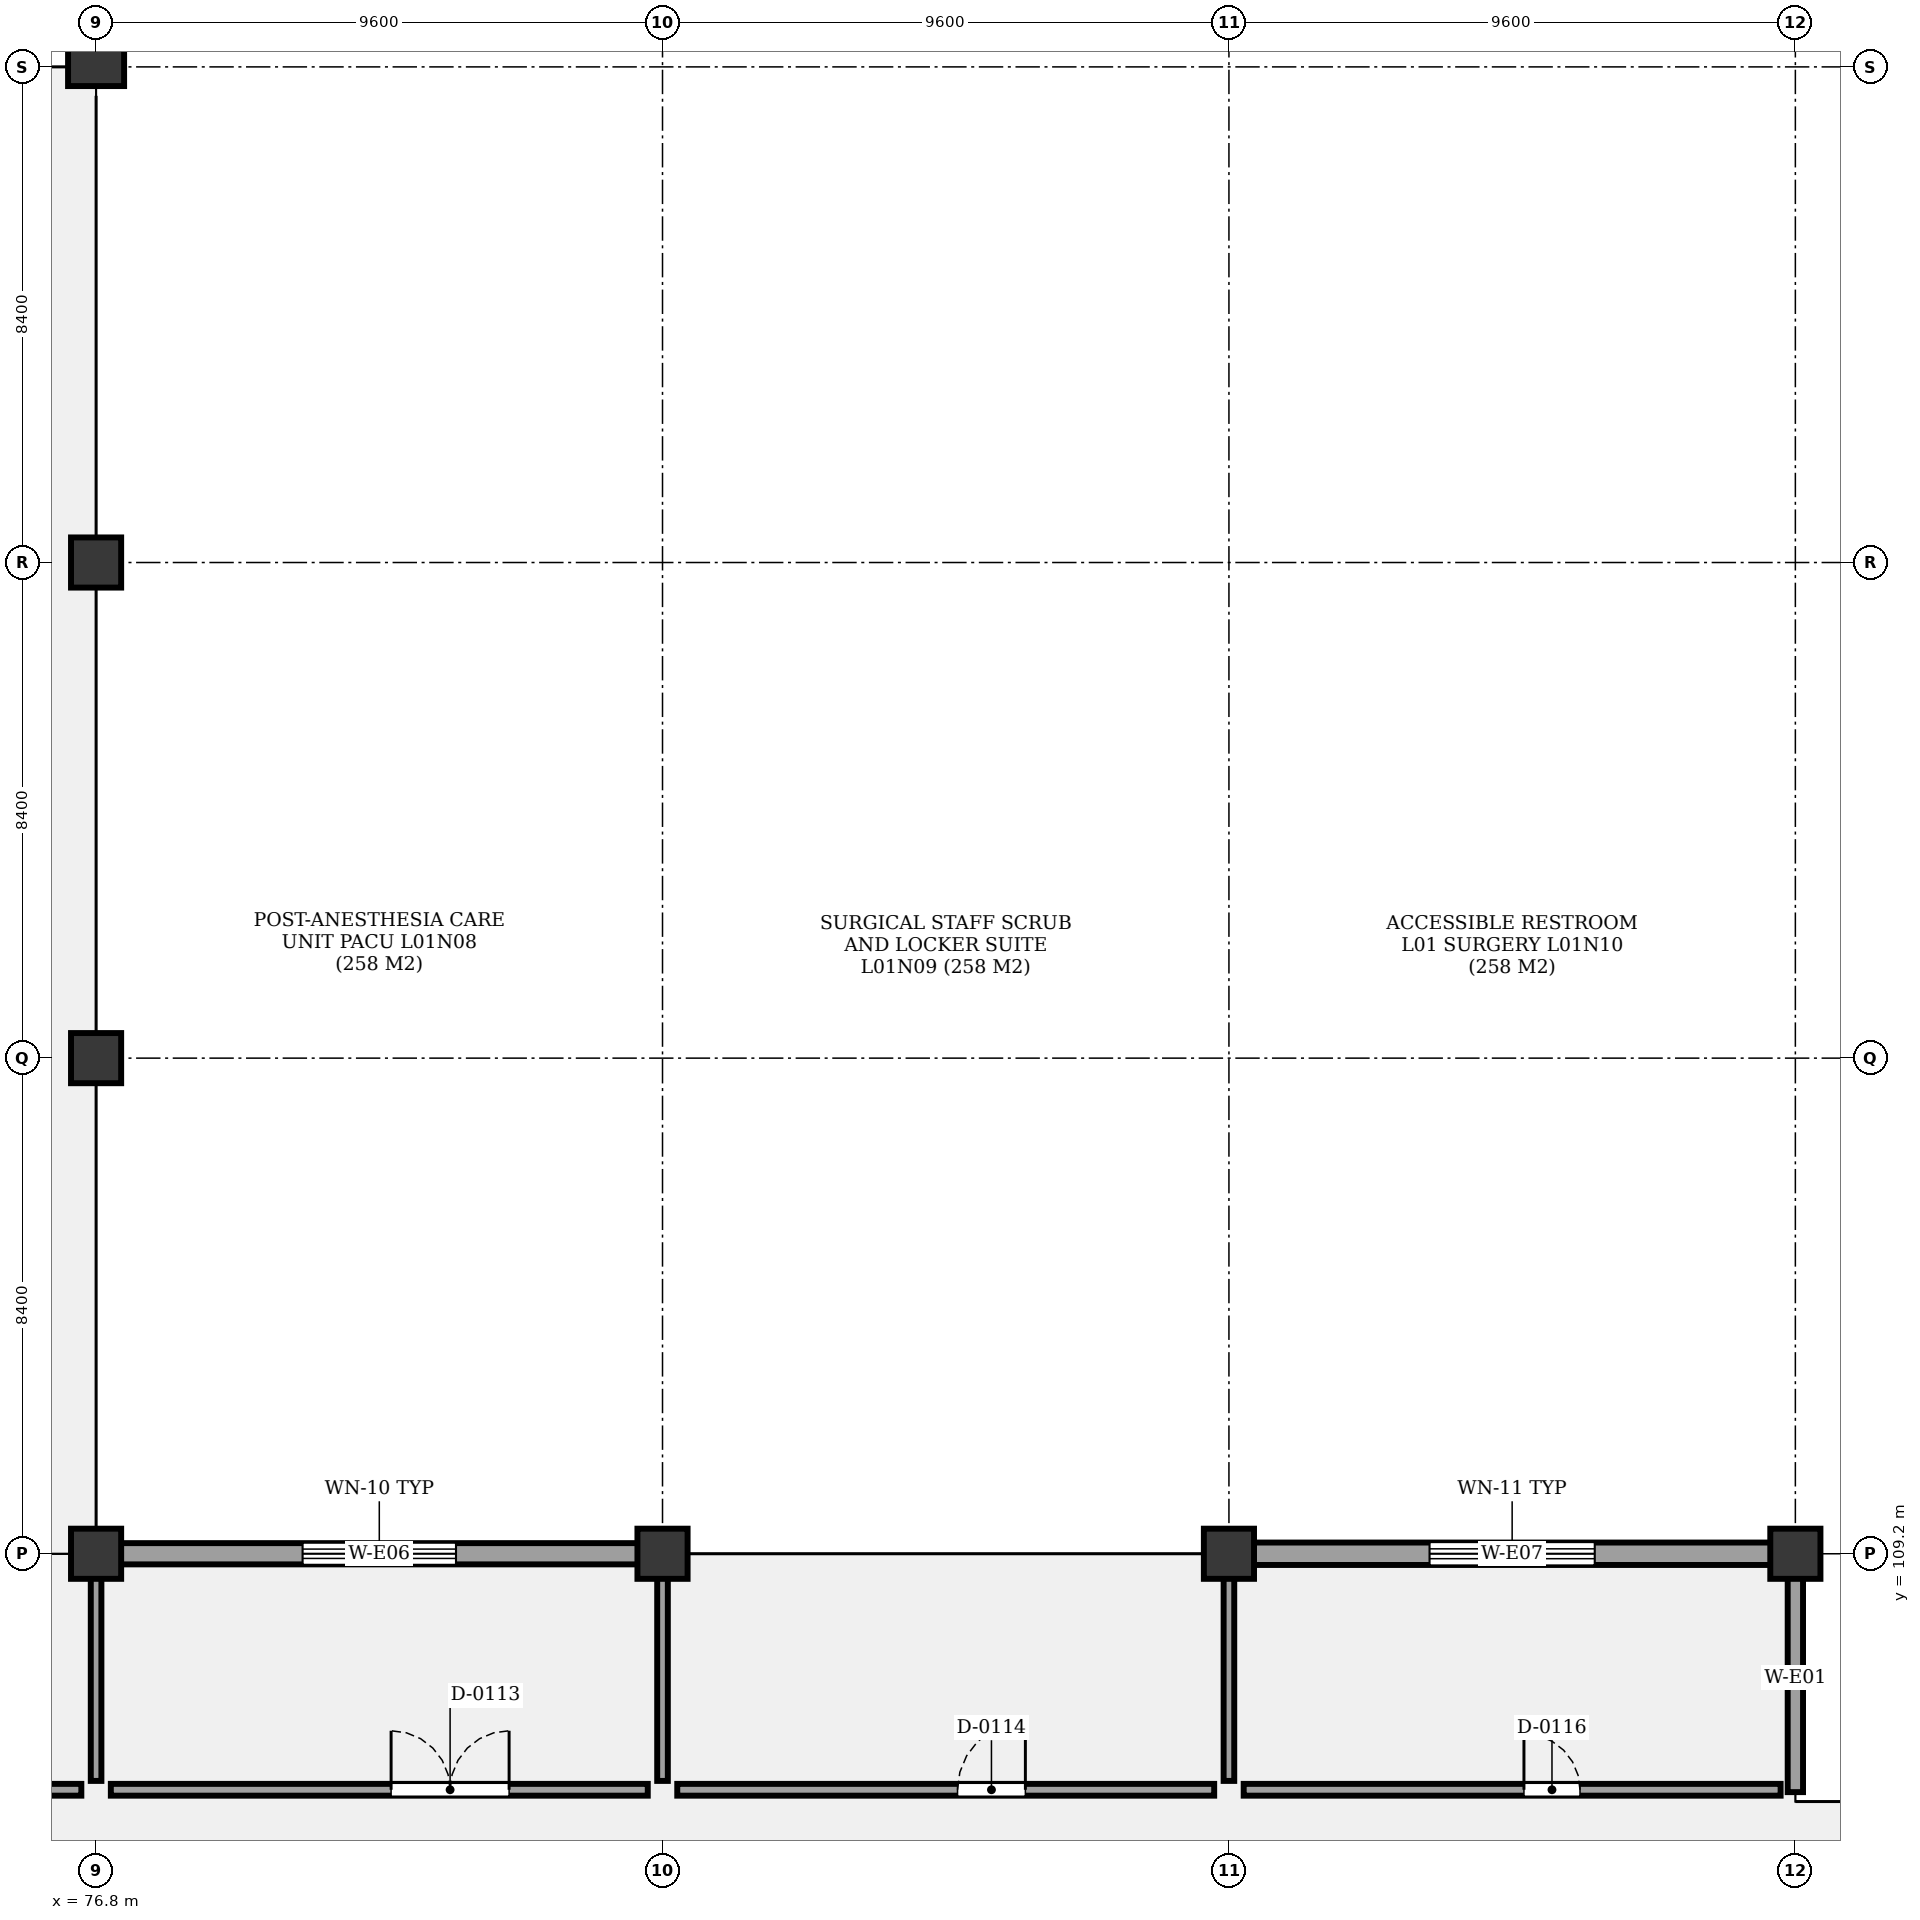
"""IFC4 building model, lengths in metres.
Left out: names, types, materials, properties, quantities, classifications, styles, units other than length and angle.
Written with IfcOpenShell. Run it as: python <this file> out.ifc"""

import sys

from ifc_helpers import new_model, si_unit, direction, frame, frame_2d, origin, origin_2d, place, context, subcontext, project, spatial, rectangle, extrude, element, fill, save


model = new_model("IFC4")
c1 = context("Model", 3, precision=1e-05, world=origin(), true_north=direction((0.0, 1.0)))
c2 = subcontext(c1, "Body", "Model", "MODEL_VIEW")
j1 = project(units=[si_unit("LENGTHUNIT", "METRE"), si_unit("PLANEANGLEUNIT", "RADIAN")], contexts=[c1])
p1 = place(None, origin())
s1 = spatial("IfcSite", under=j1, at=p1, CompositionType="ELEMENT")
p2 = place(p1, origin())
s2 = spatial("IfcBuilding", under=s1, at=p2, CompositionType="ELEMENT")
p3 = place(p2, frame((0.0, 0.0, 5.1)))
s3 = spatial("IfcBuildingStorey", under=s2, at=p3, CompositionType="ELEMENT", Elevation=5.1)
for number, where, z_axis, x_axis in (
    (1, (76.8, 109.2, 0.0), (0.0, 0.0, 1.0), (1.0, 0.0, 0.0)),
    (2, (76.8, 117.6, 0.0), (0.0, 0.0, 1.0), (1.0, 0.0, 0.0)),
    (3, (76.8, 126.0, 0.0), (0.0, 0.0, 1.0), (1.0, 0.0, 0.0)),
):
    element("IfcColumn", number, at=place(p3, frame(where, z_axis=z_axis, x_axis=x_axis)), inside=s3, PredefinedType="COLUMN", context=c2, shape_type="SweptSolid", body=[
        extrude(rectangle(XDim=0.85, YDim=0.85, at=origin_2d()), origin(), (0.0, 0.0, 1.0), 4.8),
    ])
p4 = place(p3, frame((76.8, 134.4, 0.0), z_axis=(0.0, 0.0, 1.0), x_axis=(0.0, 1.0, 0.0)))
e4 = element("IfcColumn", 4, at=p4, inside=s3, PredefinedType="COLUMN", context=c2, shape_type="SweptSolid", body=[
    extrude(rectangle(XDim=0.95, YDim=0.65, at=origin_2d()), origin(), (0.0, 0.0, 1.0), 4.8),
])
for number, where, z_axis, x_axis in (
    (5, (86.4, 109.2, 0.0), (0.0, 0.0, 1.0), (1.0, 0.0, 0.0)),
    (6, (96.0, 109.2, 0.0), (0.0, 0.0, 1.0), (1.0, 0.0, 0.0)),
    (7, (105.6, 109.2, 0.0), (0.0, 0.0, 1.0), (1.0, 0.0, 0.0)),
):
    element("IfcColumn", number, at=place(p3, frame(where, z_axis=z_axis, x_axis=x_axis)), inside=s3, PredefinedType="COLUMN", context=c2, shape_type="SweptSolid", body=[
        extrude(rectangle(XDim=0.85, YDim=0.85, at=origin_2d()), origin(), (0.0, 0.0, 1.0), 4.8),
    ])
p5 = place(p3, frame((76.8, 109.2, 0.0), z_axis=(0.0, 0.0, 1.0), x_axis=(1.0, 0.0, 0.0)))
e8 = element("IfcWall", 8, at=p5, inside=s3, PredefinedType="SOLIDWALL", context=c2, shape_type="SweptSolid", body=[
    extrude(rectangle(XDim=9.6, YDim=0.36, at=frame_2d((4.8, 0.0))), origin(), (0.0, 0.0, 1.0), 3.94),
])
p6 = place(p5, frame((3.5, 0.0, 0.85)))
e9 = element("IfcOpeningElement", 9, at=p6, cuts=e8, PredefinedType="OPENING", context=c2, shape_type="SweptSolid", body=[
    extrude(rectangle(XDim=2.6, YDim=1.2, at=frame_2d((1.3, 0.6))), frame((0.0, 0.19, 0.0), z_axis=(0.0, -1.0, 0.0), x_axis=(1.0, 0.0, 0.0)), (0.0, 0.0, 1.0), 0.38),
])
p7 = place(p3, frame((96.0, 109.2, 0.0), z_axis=(0.0, 0.0, 1.0), x_axis=(1.0, 0.0, 0.0)))
e10 = element("IfcWall", 10, at=p7, inside=s3, PredefinedType="SOLIDWALL", context=c2, shape_type="SweptSolid", body=[
    extrude(rectangle(XDim=9.6, YDim=0.38, at=frame_2d((4.8, 0.0))), origin(), (0.0, 0.0, 1.0), 3.94),
])
p8 = place(p7, frame((3.4, 0.0, 0.85)))
e11 = element("IfcOpeningElement", 11, at=p8, cuts=e10, PredefinedType="OPENING", context=c2, shape_type="SweptSolid", body=[
    extrude(rectangle(XDim=2.8, YDim=1.2, at=frame_2d((1.4, 0.6))), frame((0.0, 0.2, 0.0), z_axis=(0.0, -1.0, 0.0), x_axis=(1.0, 0.0, 0.0)), (0.0, 0.0, 1.0), 0.4),
])
p9 = place(p3, frame((105.6, 109.04, 0.0), z_axis=(0.0, 0.0, 1.0), x_axis=(0.0, -1.0, 0.0)))
e12 = element("IfcWall", 12, at=p9, inside=s3, PredefinedType="SOLIDWALL", context=c2, shape_type="SweptSolid", body=[
    extrude(rectangle(XDim=3.88, YDim=0.26, at=frame_2d((1.94, 0.0))), origin(), (0.0, 0.0, 1.0), 3.94),
])
p10 = place(p3, frame((67.45, 105.2, 0.0), z_axis=(0.0, 0.0, 1.0), x_axis=(1.0, 0.0, 0.0)))
e13 = element("IfcWall", 13, at=p10, inside=s3, PredefinedType="PARTITIONING", context=c2, shape_type="SweptSolid", body=[
    extrude(rectangle(XDim=9.1, YDim=0.2, at=frame_2d((4.55, 0.0))), origin(), (0.0, 0.0, 1.0), 3.68),
])
p11 = place(p10, frame((4.75, 0.0, 0.0)))
e14 = element("IfcOpeningElement", 14, at=p11, cuts=e13, PredefinedType="OPENING", context=c2, shape_type="SweptSolid", body=[
    extrude(rectangle(XDim=1.8, YDim=2.4, at=frame_2d((0.9, 1.2))), frame((0.0, 0.11, 0.0), z_axis=(0.0, -1.0, 0.0), x_axis=(1.0, 0.0, 0.0)), (0.0, 0.0, 1.0), 0.22),
])
p12 = place(p3, frame((77.05, 105.2, 0.0), z_axis=(0.0, 0.0, 1.0), x_axis=(1.0, 0.0, 0.0)))
e15 = element("IfcWall", 15, at=p12, inside=s3, PredefinedType="PARTITIONING", context=c2, shape_type="SweptSolid", body=[
    extrude(rectangle(XDim=9.1, YDim=0.2, at=frame_2d((4.55, 0.0))), origin(), (0.0, 0.0, 1.0), 3.68),
])
p13 = place(p12, frame((4.75, 0.0, 0.0)))
e16 = element("IfcOpeningElement", 16, at=p13, cuts=e15, PredefinedType="OPENING", context=c2, shape_type="SweptSolid", body=[
    extrude(rectangle(XDim=2.0, YDim=2.4, at=frame_2d((1.0, 1.2))), frame((0.0, 0.11, 0.0), z_axis=(0.0, -1.0, 0.0), x_axis=(1.0, 0.0, 0.0)), (0.0, 0.0, 1.0), 0.22),
])
p14 = place(p3, frame((76.8, 105.35, 0.0), z_axis=(0.0, 0.0, 1.0), x_axis=(0.0, 1.0, 0.0)))
e17 = element("IfcWall", 17, at=p14, inside=s3, PredefinedType="PARTITIONING", context=c2, shape_type="SweptSolid", body=[
    extrude(rectangle(XDim=3.65, YDim=0.18, at=frame_2d((1.825, 0.0))), origin(), (0.0, 0.0, 1.0), 3.68),
])
p15 = place(p3, frame((86.65, 105.2, 0.0), z_axis=(0.0, 0.0, 1.0), x_axis=(1.0, 0.0, 0.0)))
e18 = element("IfcWall", 18, at=p15, inside=s3, PredefinedType="PARTITIONING", context=c2, shape_type="SweptSolid", body=[
    extrude(rectangle(XDim=9.1, YDim=0.2, at=frame_2d((4.55, 0.0))), origin(), (0.0, 0.0, 1.0), 3.68),
])
p16 = place(p15, frame((4.75, 0.0, 0.0)))
e19 = element("IfcOpeningElement", 19, at=p16, cuts=e18, PredefinedType="OPENING", context=c2, shape_type="SweptSolid", body=[
    extrude(rectangle(XDim=1.15, YDim=2.2, at=frame_2d((0.575, 1.1))), frame((0.0, 0.11, 0.0), z_axis=(0.0, -1.0, 0.0), x_axis=(1.0, 0.0, 0.0)), (0.0, 0.0, 1.0), 0.22),
])
p17 = place(p3, frame((86.4, 105.35, 0.0), z_axis=(0.0, 0.0, 1.0), x_axis=(0.0, 1.0, 0.0)))
e20 = element("IfcWall", 20, at=p17, inside=s3, PredefinedType="PARTITIONING", context=c2, shape_type="SweptSolid", body=[
    extrude(rectangle(XDim=3.65, YDim=0.18, at=frame_2d((1.825, 0.0))), origin(), (0.0, 0.0, 1.0), 3.68),
])
p18 = place(p3, frame((96.25, 105.2, 0.0), z_axis=(0.0, 0.0, 1.0), x_axis=(1.0, 0.0, 0.0)))
e21 = element("IfcWall", 21, at=p18, inside=s3, PredefinedType="PARTITIONING", context=c2, shape_type="SweptSolid", body=[
    extrude(rectangle(XDim=9.1, YDim=0.2, at=frame_2d((4.55, 0.0))), origin(), (0.0, 0.0, 1.0), 3.68),
])
p19 = place(p18, frame((4.75, 0.0, 0.0)))
e22 = element("IfcOpeningElement", 22, at=p19, cuts=e21, PredefinedType="OPENING", context=c2, shape_type="SweptSolid", body=[
    extrude(rectangle(XDim=0.95, YDim=2.1, at=frame_2d((0.475, 1.05))), frame((0.0, 0.11, 0.0), z_axis=(0.0, -1.0, 0.0), x_axis=(1.0, 0.0, 0.0)), (0.0, 0.0, 1.0), 0.22),
])
p20 = place(p3, frame((96.0, 105.35, 0.0), z_axis=(0.0, 0.0, 1.0), x_axis=(0.0, 1.0, 0.0)))
e23 = element("IfcWall", 23, at=p20, inside=s3, PredefinedType="PARTITIONING", context=c2, shape_type="SweptSolid", body=[
    extrude(rectangle(XDim=3.65, YDim=0.18, at=frame_2d((1.825, 0.0))), origin(), (0.0, 0.0, 1.0), 3.68),
])
p21 = place(p6, origin())
e24 = element("IfcWindow", 24, at=p21, inside=s3, PartitioningType="SINGLE_PANEL", PredefinedType="WINDOW", context=c2, shape_type="SweptSolid", body=[
    extrude(rectangle(XDim=2.6, YDim=1.2, at=frame_2d((1.3, 0.6))), frame((0.0, 0.03, 0.0), z_axis=(0.0, -1.0, 0.0), x_axis=(1.0, 0.0, 0.0)), (0.0, 0.0, 1.0), 0.06),
])
fill(e9, e24)
p22 = place(p8, origin())
e25 = element("IfcWindow", 25, at=p22, inside=s3, PartitioningType="SINGLE_PANEL", PredefinedType="WINDOW", context=c2, shape_type="SweptSolid", body=[
    extrude(rectangle(XDim=2.8, YDim=1.2, at=frame_2d((1.4, 0.6))), frame((0.0, 0.03, 0.0), z_axis=(0.0, -1.0, 0.0), x_axis=(1.0, 0.0, 0.0)), (0.0, 0.0, 1.0), 0.06),
])
fill(e11, e25)
p23 = place(p13, origin())
e26 = element("IfcDoor", 26, at=p23, inside=s3, OperationType="DOUBLE_DOOR_SINGLE_SWING", PredefinedType="DOOR", context=c2, shape_type="SweptSolid", body=[
    extrude(rectangle(XDim=2.0, YDim=2.4, at=frame_2d((1.0, 1.2))), frame((0.0, 0.025, 0.0), z_axis=(0.0, -1.0, 0.0), x_axis=(1.0, 0.0, 0.0)), (0.0, 0.0, 1.0), 0.05),
])
fill(e16, e26)
p24 = place(p16, origin())
e27 = element("IfcDoor", 27, at=p24, inside=s3, OperationType="SINGLE_SWING_RIGHT", PredefinedType="DOOR", context=c2, shape_type="SweptSolid", body=[
    extrude(rectangle(XDim=1.15, YDim=2.2, at=frame_2d((0.575, 1.1))), frame((0.0, 0.025, 0.0), z_axis=(0.0, -1.0, 0.0), x_axis=(1.0, 0.0, 0.0)), (0.0, 0.0, 1.0), 0.05),
])
fill(e19, e27)
p25 = place(p19, origin())
e28 = element("IfcDoor", 28, at=p25, inside=s3, OperationType="SINGLE_SWING_LEFT", PredefinedType="DOOR", context=c2, shape_type="SweptSolid", body=[
    extrude(rectangle(XDim=0.95, YDim=2.1, at=frame_2d((0.475, 1.05))), frame((0.0, 0.025, 0.0), z_axis=(0.0, -1.0, 0.0), x_axis=(1.0, 0.0, 0.0)), (0.0, 0.0, 1.0), 0.05),
])
fill(e22, e28)
save(model, sys.argv[1])
